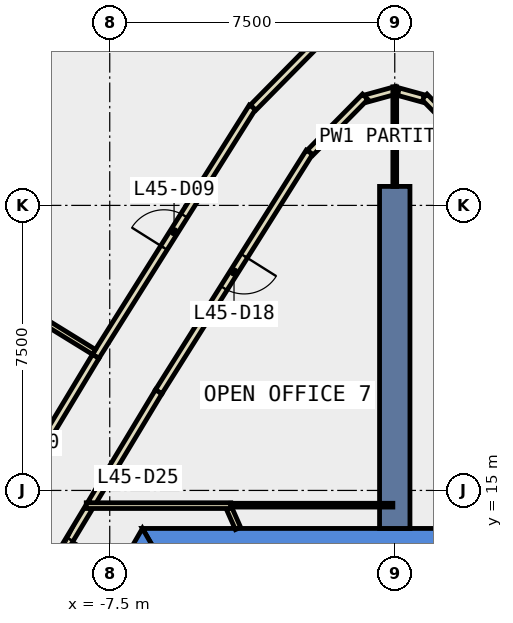
"""IFC4 building model, lengths in metres.
Left out: names, types, materials, properties, quantities, classifications, styles, units other than length and angle.
Written with IfcOpenShell. Run it as: python <this file> out.ifc"""

import sys

from ifc_helpers import new_model, si_unit, direction, frame, frame_2d, origin, place, context, subcontext, project, spatial, polyline, rectangle, outline, extrude, element, fill, save


model = new_model("IFC4")
c1 = context("Model", 3, precision=1e-05, world=origin(), true_north=direction((0.0, 1.0)))
c2 = subcontext(c1, "Body", "Model", "MODEL_VIEW")
j1 = project(units=[si_unit("LENGTHUNIT", "METRE"), si_unit("PLANEANGLEUNIT", "RADIAN")], contexts=[c1])
p1 = place(None, origin())
s1 = spatial("IfcSite", under=j1, at=p1, CompositionType="ELEMENT")
p2 = place(p1, origin())
s2 = spatial("IfcBuilding", under=s1, at=p2, CompositionType="ELEMENT")
p3 = place(p2, frame((0.0, 0.0, 202.4)))
s3 = spatial("IfcBuildingStorey", under=s2, at=p3, CompositionType="ELEMENT", Elevation=202.4)
p4 = place(p3, frame((0.0, 0.0, -0.4)))
e1 = element("IfcWall", 1, at=p4, inside=s3, PredefinedType="SHEAR", context=c2, shape_type="SweptSolid", body=[
    extrude(outline(polyline([(6.64, 14.0), (-6.64, 14.0), (-6.235, 13.3), (6.235, 13.3), (6.64, 14.0)])), origin(), (0.0, 0.0, 1.0), 4.2),
])
p5 = place(p3, frame((0.0, 0.0, -0.4)))
e2 = element("IfcWall", 2, at=p5, inside=s3, PredefinedType="SHEAR", context=c2, shape_type="SweptSolid", body=[
    extrude(outline(polyline([(-11.834, 5.002), (-11.228, 4.652), (-6.235, 13.3), (-6.64, 14.0), (-11.834, 5.002)])), origin(), (0.0, 0.0, 1.0), 4.2),
])
p6 = place(p3, frame((0.0, 14.0, -0.4), z_axis=(0.0, 0.0, 1.0), x_axis=(0.0, 1.0, 0.0)))
e3 = element("IfcWall", 3, at=p6, inside=s3, PredefinedType="SHEAR", context=c2, shape_type="SweptSolid", body=[
    extrude(rectangle(XDim=9.0, YDim=0.8, at=frame_2d((4.5, 0.0))), origin(), (0.0, 0.0, 1.0), 4.2),
])
p7 = place(p3, frame((-8.759, 28.29, 0.0), z_axis=(0.0, 0.0, 1.0), x_axis=(-0.532522107002, -0.84641609481, 0.0)))
e4 = element("IfcWall", 4, at=p7, inside=s3, PredefinedType="STANDARD", context=c2, shape_type="SweptSolid", body=[
    extrude(rectangle(XDim=7.273, YDim=0.3, at=frame_2d((3.636, 0.0))), origin(), (0.0, 0.0, 1.0), 3.8),
])
p8 = place(p7, frame((0.618, 0.0, 0.9)))
e5 = element("IfcOpeningElement", 5, at=p8, cuts=e4, PredefinedType="OPENING", context=c2, shape_type="SweptSolid", body=[
    extrude(rectangle(XDim=2.4, YDim=2.6, at=frame_2d((1.2, 1.3))), frame((0.0, 0.16, 0.0), z_axis=(0.0, -1.0, 0.0), x_axis=(1.0, 0.0, 0.0)), (0.0, 0.0, 1.0), 0.32),
])
p9 = place(p7, frame((4.255, 0.0, 0.9)))
e6 = element("IfcOpeningElement", 6, at=p9, cuts=e4, PredefinedType="OPENING", context=c2, shape_type="SweptSolid", body=[
    extrude(rectangle(XDim=2.4, YDim=2.6, at=frame_2d((1.2, 1.3))), frame((0.0, 0.16, 0.0), z_axis=(0.0, -1.0, 0.0), x_axis=(1.0, 0.0, 0.0)), (0.0, 0.0, 1.0), 0.32),
])
p10 = place(p3, frame((-8.057, 14.536, 0.0), z_axis=(0.0, 0.0, 1.0), x_axis=(-0.516268010323, -0.856427078926, 0.0)))
e7 = element("IfcWall", 7, at=p10, inside=s3, PredefinedType="PARTITIONING", context=c2, shape_type="SweptSolid", body=[
    extrude(rectangle(XDim=2.915, YDim=0.2, at=frame_2d((1.458, 0.0))), origin(), (0.0, 0.0, 1.0), 3.8),
])
p11 = place(p10, frame((0.958, 0.0, 0.0)))
e8 = element("IfcOpeningElement", 8, at=p11, cuts=e7, PredefinedType="OPENING", context=c2, shape_type="SweptSolid", body=[
    extrude(rectangle(XDim=1.0, YDim=2.1, at=frame_2d((0.5, 1.05))), frame((0.0, 0.11, 0.0), z_axis=(0.0, -1.0, 0.0), x_axis=(1.0, 0.0, 0.0)), (0.0, 0.0, 1.0), 0.22),
])
p12 = place(p3, frame((2.229, 23.887, 0.0), z_axis=(0.0, 0.0, 1.0), x_axis=(-0.702245482258, 0.711934886523, 0.0)))
e9 = element("IfcWall", 9, at=p12, inside=s3, PredefinedType="PARTITIONING", context=c2, shape_type="SweptSolid", body=[
    extrude(rectangle(XDim=2.066, YDim=0.2, at=frame_2d((1.033, 0.0))), origin(), (0.0, 0.0, 1.0), 3.8),
])
p13 = place(p3, frame((0.752, 25.313, 0.0), z_axis=(0.0, 0.0, 1.0), x_axis=(-0.964381816756, 0.264514104559, 0.0)))
e10 = element("IfcWall", 10, at=p13, inside=s3, PredefinedType="PARTITIONING", context=c2, shape_type="SweptSolid", body=[
    extrude(rectangle(XDim=0.68, YDim=0.2, at=frame_2d((0.34, 0.0))), origin(), (0.0, 0.0, 1.0), 3.8),
])
p14 = place(p3, frame((0.048, 25.533, 0.0), z_axis=(0.0, 0.0, 1.0), x_axis=(-0.964218556253, -0.265108611286, 0.0)))
e11 = element("IfcWall", 11, at=p14, inside=s3, PredefinedType="PARTITIONING", context=c2, shape_type="SweptSolid", body=[
    extrude(rectangle(XDim=0.83, YDim=0.2, at=frame_2d((0.415, 0.0))), origin(), (0.0, 0.0, 1.0), 3.8),
])
p15 = place(p3, frame((-0.778, 25.358, 0.0), z_axis=(0.0, 0.0, 1.0), x_axis=(-0.702245482258, -0.711934886523, 0.0)))
e12 = element("IfcWall", 12, at=p15, inside=s3, PredefinedType="PARTITIONING", context=c2, shape_type="SweptSolid", body=[
    extrude(rectangle(XDim=2.066, YDim=0.2, at=frame_2d((1.033, 0.0))), origin(), (0.0, 0.0, 1.0), 3.8),
])
p16 = place(p3, frame((-2.246, 23.9, 0.0), z_axis=(0.0, 0.0, 1.0), x_axis=(-0.532527247309, -0.846412860768, 0.0)))
e13 = element("IfcWall", 13, at=p16, inside=s3, PredefinedType="PARTITIONING", context=c2, shape_type="SweptSolid", body=[
    extrude(rectangle(XDim=7.449, YDim=0.2, at=frame_2d((3.725, 0.0))), origin(), (0.0, 0.0, 1.0), 3.8),
])
p17 = place(p16, frame((3.225, 0.0, 0.0)))
e14 = element("IfcOpeningElement", 14, at=p17, cuts=e13, PredefinedType="OPENING", context=c2, shape_type="SweptSolid", body=[
    extrude(rectangle(XDim=1.0, YDim=2.1, at=frame_2d((0.5, 1.05))), frame((0.0, 0.11, 0.0), z_axis=(0.0, -1.0, 0.0), x_axis=(1.0, 0.0, 0.0)), (0.0, 0.0, 1.0), 0.22),
])
p18 = place(p3, frame((-6.213, 17.595, 0.0), z_axis=(0.0, 0.0, 1.0), x_axis=(-0.516121112316, -0.856515614231, 0.0)))
e15 = element("IfcWall", 15, at=p18, inside=s3, PredefinedType="PARTITIONING", context=c2, shape_type="SweptSolid", body=[
    extrude(rectangle(XDim=3.422, YDim=0.2, at=frame_2d((1.711, 0.0))), origin(), (0.0, 0.0, 1.0), 3.8),
])
p19 = place(p3, frame((-7.871, 18.528, 0.0), z_axis=(0.0, 0.0, 1.0), x_axis=(0.532587642146, 0.846374859878, 0.0)))
e16 = element("IfcWall", 16, at=p19, inside=s3, PredefinedType="PARTITIONING", context=c2, shape_type="SweptSolid", body=[
    extrude(rectangle(XDim=7.749, YDim=0.2, at=frame_2d((3.875, 0.0))), origin(), (0.0, 0.0, 1.0), 3.8),
])
p20 = place(p19, frame((3.375, 0.0, 0.0)))
e17 = element("IfcOpeningElement", 17, at=p20, cuts=e16, PredefinedType="OPENING", context=c2, shape_type="SweptSolid", body=[
    extrude(rectangle(XDim=1.0, YDim=2.1, at=frame_2d((0.5, 1.05))), frame((0.0, 0.11, 0.0), z_axis=(0.0, -1.0, 0.0), x_axis=(1.0, 0.0, 0.0)), (0.0, 0.0, 1.0), 0.22),
])
p21 = place(p3, frame((-3.727, 25.074, 0.0), z_axis=(0.0, 0.0, 1.0), x_axis=(0.702089218366, 0.712088989842, 0.0)))
e18 = element("IfcWall", 18, at=p21, inside=s3, PredefinedType="PARTITIONING", context=c2, shape_type="SweptSolid", body=[
    extrude(rectangle(XDim=2.783, YDim=0.2, at=frame_2d((1.392, 0.0))), origin(), (0.0, 0.0, 1.0), 3.8),
])
p22 = place(p3, frame((-12.025, 11.633, 0.0), z_axis=(0.0, 0.0, 1.0), x_axis=(0.516283129542, 0.856417964636, 0.0)))
e19 = element("IfcWall", 19, at=p22, inside=s3, PredefinedType="PARTITIONING", context=c2, shape_type="SweptSolid", body=[
    extrude(rectangle(XDim=8.05, YDim=0.2, at=frame_2d((4.025, 0.0))), origin(), (0.0, 0.0, 1.0), 3.8),
])
p23 = place(p22, frame((3.6, 0.0, 0.0)))
e20 = element("IfcOpeningElement", 20, at=p23, cuts=e19, PredefinedType="OPENING", context=c2, shape_type="SweptSolid", body=[
    extrude(rectangle(XDim=1.0, YDim=2.1, at=frame_2d((0.5, 1.05))), frame((0.0, 0.11, 0.0), z_axis=(0.0, -1.0, 0.0), x_axis=(1.0, 0.0, 0.0)), (0.0, 0.0, 1.0), 0.22),
])
p24 = place(p3, frame((-4.125, 14.0, 0.0), z_axis=(0.0, 0.0, 1.0), x_axis=(-0.404850841056, 0.914382740703, 0.0)))
e21 = element("IfcWall", 21, at=p24, inside=s3, PredefinedType="PARTITIONING", context=c2, shape_type="SweptSolid", body=[
    extrude(rectangle(XDim=0.581, YDim=0.15, at=frame_2d((0.291, 0.0))), origin(), (0.0, 0.0, 1.0), 3.8),
])
p25 = place(p3, frame((-4.316, 14.6, 0.0), z_axis=(0.0, 0.0, 1.0), x_axis=(-1.0, 0.0, 0.0)))
e22 = element("IfcWall", 22, at=p25, inside=s3, PredefinedType="PARTITIONING", context=c2, shape_type="SweptSolid", body=[
    extrude(rectangle(XDim=3.802, YDim=0.15, at=frame_2d((1.901, 0.0))), origin(), (0.0, 0.0, 1.0), 3.8),
])
p26 = place(p3, frame((-4.316, 14.612, 0.0), z_axis=(0.0, 0.0, 1.0), x_axis=(1.0, 0.0, 0.0)))
e23 = element("IfcWall", 23, at=p26, inside=s3, PredefinedType="PARTITIONING", context=c2, shape_type="SweptSolid", body=[
    extrude(rectangle(XDim=4.266, YDim=0.1, at=frame_2d((2.133, 0.0))), origin(), (0.0, 0.0, 1.0), 3.8),
])
p27 = place(p3, frame((0.0, 23.0, 0.0), z_axis=(0.0, 0.0, 1.0), x_axis=(0.0, 1.0, 0.0)))
e24 = element("IfcWall", 24, at=p27, inside=s3, PredefinedType="PARTITIONING", context=c2, shape_type="SweptSolid", body=[
    extrude(rectangle(XDim=2.62, YDim=0.1, at=frame_2d((1.31, 0.0))), origin(), (0.0, 0.0, 1.0), 3.8),
])
p28 = place(p3, frame((-7.916, 18.644, 0.0), z_axis=(0.0, 0.0, 1.0), x_axis=(-0.851543444049, 0.524284047914, 0.0)))
e25 = element("IfcWall", 25, at=p28, inside=s3, PredefinedType="PARTITIONING", context=c2, shape_type="SweptSolid", body=[
    extrude(rectangle(XDim=4.379, YDim=0.15, at=frame_2d((2.189, 0.0))), origin(), (0.0, 0.0, 1.0), 3.8),
])
p29 = place(p20, origin())
e26 = element("IfcDoor", 26, at=p29, inside=s3, OperationType="SINGLE_SWING_LEFT", PredefinedType="DOOR", context=c2, shape_type="SweptSolid", body=[
    extrude(rectangle(XDim=1.0, YDim=2.1, at=frame_2d((0.5, 1.05))), frame((0.0, 0.025, 0.0), z_axis=(0.0, -1.0, 0.0), x_axis=(1.0, 0.0, 0.0)), (0.0, 0.0, 1.0), 0.05),
])
fill(e17, e26)
p30 = place(p17, origin())
e27 = element("IfcDoor", 27, at=p30, inside=s3, OperationType="SINGLE_SWING_LEFT", PredefinedType="DOOR", context=c2, shape_type="SweptSolid", body=[
    extrude(rectangle(XDim=1.0, YDim=2.1, at=frame_2d((0.5, 1.05))), frame((0.0, 0.025, 0.0), z_axis=(0.0, -1.0, 0.0), x_axis=(1.0, 0.0, 0.0)), (0.0, 0.0, 1.0), 0.05),
])
fill(e14, e27)
p31 = place(p11, origin())
e28 = element("IfcDoor", 28, at=p31, inside=s3, OperationType="SINGLE_SWING_LEFT", PredefinedType="DOOR", context=c2, shape_type="SweptSolid", body=[
    extrude(rectangle(XDim=1.0, YDim=2.1, at=frame_2d((0.5, 1.05))), frame((0.0, 0.025, 0.0), z_axis=(0.0, -1.0, 0.0), x_axis=(1.0, 0.0, 0.0)), (0.0, 0.0, 1.0), 0.05),
])
fill(e8, e28)
save(model, sys.argv[1])
